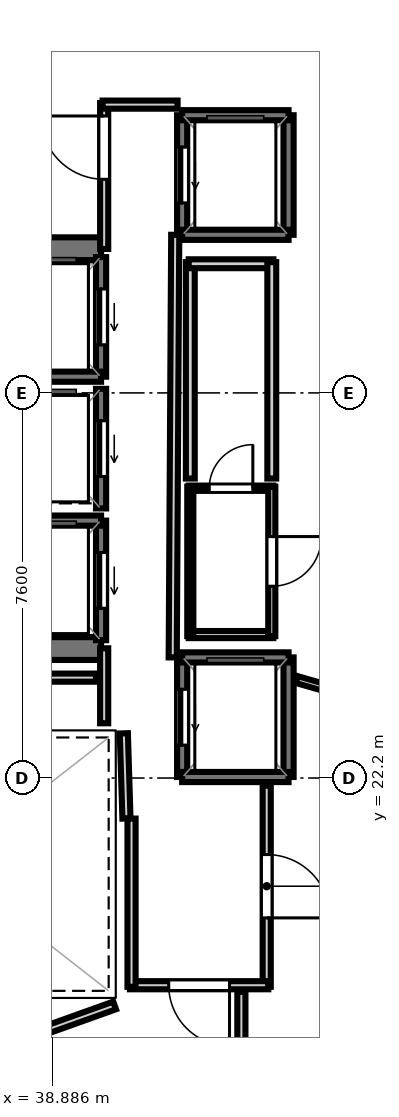
"""IFC4 building model, lengths in metres.
Left out: names, types, materials, properties, quantities, classifications, styles, units other than length and angle.
Written with IfcOpenShell. Run it as: python <this file> out.ifc"""

import sys

from ifc_helpers import new_model, si_unit, direction, frame, frame_2d, origin, place, context, subcontext, project, spatial, rectangle, extrude, element, fill, save


model = new_model("IFC4")
c1 = context("Model", 3, precision=1e-05, world=origin(), true_north=direction((0.0, 1.0)))
c2 = subcontext(c1, "Body", "Model", "MODEL_VIEW")
j1 = project(units=[si_unit("LENGTHUNIT", "METRE"), si_unit("PLANEANGLEUNIT", "RADIAN")], contexts=[c1])
p1 = place(None, origin())
s1 = spatial("IfcSite", under=j1, at=p1, CompositionType="ELEMENT")
p2 = place(p1, origin())
s2 = spatial("IfcBuilding", under=s1, at=p2, CompositionType="ELEMENT")
p3 = place(p2, frame((0.0, 0.0, 340.7)))
s3 = spatial("IfcBuildingStorey", under=s2, at=p3, CompositionType="ELEMENT", Elevation=340.7)
p4 = place(p3, frame((29.33, 32.645, 0.0), z_axis=(0.0, 0.0, 1.0), x_axis=(1.0, 0.0, 0.0)))
e1 = element("IfcWall", 1, at=p4, inside=s3, PredefinedType="SHEAR", context=c2, shape_type="SweptSolid", body=[
    extrude(rectangle(XDim=10.52, YDim=0.45, at=frame_2d((5.26, 0.0))), origin(), (0.0, 0.0, 1.0), 3.52),
])
p5 = place(p4, frame((0.895, 0.0, 0.0)))
e2 = element("IfcOpeningElement", 2, at=p5, cuts=e1, PredefinedType="OPENING", context=c2, shape_type="SweptSolid", body=[
    extrude(rectangle(XDim=1.25, YDim=2.15, at=frame_2d((0.625, 1.075))), frame((0.0, 0.235, 0.0), z_axis=(0.0, -1.0, 0.0), x_axis=(1.0, 0.0, 0.0)), (0.0, 0.0, 1.0), 0.47),
])
p6 = place(p3, frame((29.33, 24.755, 0.0), z_axis=(0.0, 0.0, 1.0), x_axis=(1.0, 0.0, 0.0)))
e3 = element("IfcWall", 3, at=p6, inside=s3, PredefinedType="SHEAR", context=c2, shape_type="SweptSolid", body=[
    extrude(rectangle(XDim=10.52, YDim=0.45, at=frame_2d((5.26, 0.0))), origin(), (0.0, 0.0, 1.0), 3.52),
])
p7 = place(p6, frame((0.695, 0.0, 0.0)))
e4 = element("IfcOpeningElement", 4, at=p7, cuts=e3, PredefinedType="OPENING", context=c2, shape_type="SweptSolid", body=[
    extrude(rectangle(XDim=1.25, YDim=2.15, at=frame_2d((0.625, 1.075))), frame((0.0, 0.235, 0.0), z_axis=(0.0, -1.0, 0.0), x_axis=(1.0, 0.0, 0.0)), (0.0, 0.0, 1.0), 0.47),
])
p8 = place(p3, frame((39.85, 30.12, 0.0), z_axis=(0.0, 0.0, 1.0), x_axis=(0.0, 1.0, 0.0)))
e5 = element("IfcWall", 5, at=p8, inside=s3, PredefinedType="SOLIDWALL", context=c2, shape_type="SweptSolid", body=[
    extrude(rectangle(XDim=2.36, YDim=0.2, at=frame_2d((1.18, 0.0))), origin(), (0.0, 0.0, 1.0), 3.52),
])
p9 = place(p8, frame((0.63, 0.0, 0.0)))
e6 = element("IfcOpeningElement", 6, at=p9, cuts=e5, PredefinedType="OPENING", context=c2, shape_type="SweptSolid", body=[
    extrude(rectangle(XDim=1.1, YDim=2.15, at=frame_2d((0.55, 1.075))), frame((0.0, 0.11, 0.0), z_axis=(0.0, -1.0, 0.0), x_axis=(1.0, 0.0, 0.0)), (0.0, 0.0, 1.0), 0.22),
])
p10 = place(p3, frame((37.75, 30.12, 0.0), z_axis=(0.0, 0.0, 1.0), x_axis=(1.0, 0.0, 0.0)))
e7 = element("IfcWall", 7, at=p10, inside=s3, PredefinedType="SOLIDWALL", context=c2, shape_type="SweptSolid", body=[
    extrude(rectangle(XDim=2.1, YDim=0.2, at=frame_2d((1.05, 0.0))), origin(), (0.0, 0.0, 1.0), 3.52),
])
p11 = place(p3, frame((39.85, 24.92, 0.0), z_axis=(0.0, 0.0, 1.0), x_axis=(0.0, 1.0, 0.0)))
e8 = element("IfcWall", 8, at=p11, inside=s3, PredefinedType="SOLIDWALL", context=c2, shape_type="SweptSolid", body=[
    extrude(rectangle(XDim=2.36, YDim=0.2, at=frame_2d((1.18, 0.0))), origin(), (0.0, 0.0, 1.0), 3.52),
])
p12 = place(p11, frame((0.63, 0.0, 0.0)))
e9 = element("IfcOpeningElement", 9, at=p12, cuts=e8, PredefinedType="OPENING", context=c2, shape_type="SweptSolid", body=[
    extrude(rectangle(XDim=1.1, YDim=2.15, at=frame_2d((0.55, 1.075))), frame((0.0, 0.11, 0.0), z_axis=(0.0, -1.0, 0.0), x_axis=(1.0, 0.0, 0.0)), (0.0, 0.0, 1.0), 0.22),
])
p13 = place(p3, frame((37.75, 27.28, 0.0), z_axis=(0.0, 0.0, 1.0), x_axis=(1.0, 0.0, 0.0)))
e10 = element("IfcWall", 10, at=p13, inside=s3, PredefinedType="SOLIDWALL", context=c2, shape_type="SweptSolid", body=[
    extrude(rectangle(XDim=2.1, YDim=0.2, at=frame_2d((1.05, 0.0))), origin(), (0.0, 0.0, 1.0), 3.52),
])
p14 = place(p3, frame((39.85, 27.52, 0.0), z_axis=(0.0, 0.0, 1.0), x_axis=(0.0, 1.0, 0.0)))
e11 = element("IfcWall", 11, at=p14, inside=s3, PredefinedType="SOLIDWALL", context=c2, shape_type="SweptSolid", body=[
    extrude(rectangle(XDim=2.36, YDim=0.2, at=frame_2d((1.18, 0.0))), origin(), (0.0, 0.0, 1.0), 3.52),
])
p15 = place(p14, frame((0.63, 0.0, 0.0)))
e12 = element("IfcOpeningElement", 12, at=p15, cuts=e11, PredefinedType="OPENING", context=c2, shape_type="SweptSolid", body=[
    extrude(rectangle(XDim=1.1, YDim=2.15, at=frame_2d((0.55, 1.075))), frame((0.0, 0.11, 0.0), z_axis=(0.0, -1.0, 0.0), x_axis=(1.0, 0.0, 0.0)), (0.0, 0.0, 1.0), 0.22),
])
p16 = place(p3, frame((43.55, 22.22, 0.0), z_axis=(0.0, 0.0, 1.0), x_axis=(0.0, 1.0, 0.0)))
e13 = element("IfcWall", 13, at=p16, inside=s3, PredefinedType="SOLIDWALL", context=c2, shape_type="SweptSolid", body=[
    extrude(rectangle(XDim=2.36, YDim=0.2, at=frame_2d((1.18, 0.0))), origin(), (0.0, 0.0, 1.0), 3.52),
])
p17 = place(p3, frame((41.45, 22.22, 0.0), z_axis=(0.0, 0.0, 1.0), x_axis=(0.0, 1.0, 0.0)))
e14 = element("IfcWall", 14, at=p17, inside=s3, PredefinedType="SOLIDWALL", context=c2, shape_type="SweptSolid", body=[
    extrude(rectangle(XDim=2.36, YDim=0.2, at=frame_2d((1.18, 0.0))), origin(), (0.0, 0.0, 1.0), 3.52),
])
p18 = place(p17, frame((0.63, 0.0, 0.0)))
e15 = element("IfcOpeningElement", 15, at=p18, cuts=e14, PredefinedType="OPENING", context=c2, shape_type="SweptSolid", body=[
    extrude(rectangle(XDim=1.1, YDim=2.15, at=frame_2d((0.55, 1.075))), frame((0.0, 0.11, 0.0), z_axis=(0.0, -1.0, 0.0), x_axis=(1.0, 0.0, 0.0)), (0.0, 0.0, 1.0), 0.22),
])
for number, where, z_axis, x_axis in (
    (16, (41.45, 24.58, 0.0), (0.0, 0.0, 1.0), (1.0, 0.0, 0.0)),
    (17, (41.45, 22.22, 0.0), (0.0, 0.0, 1.0), (1.0, 0.0, 0.0)),
):
    element("IfcWall", number, at=place(p3, frame(where, z_axis=z_axis, x_axis=x_axis)), inside=s3, PredefinedType="SOLIDWALL", context=c2, shape_type="SweptSolid", body=[
        extrude(rectangle(XDim=2.1, YDim=0.2, at=frame_2d((1.05, 0.0))), origin(), (0.0, 0.0, 1.0), 3.52),
    ])
p19 = place(p3, frame((43.55, 32.92, 0.0), z_axis=(0.0, 0.0, 1.0), x_axis=(0.0, 1.0, 0.0)))
e18 = element("IfcWall", 18, at=p19, inside=s3, PredefinedType="SOLIDWALL", context=c2, shape_type="SweptSolid", body=[
    extrude(rectangle(XDim=2.36, YDim=0.2, at=frame_2d((1.18, 0.0))), origin(), (0.0, 0.0, 1.0), 3.52),
])
p20 = place(p3, frame((41.45, 32.92, 0.0), z_axis=(0.0, 0.0, 1.0), x_axis=(0.0, 1.0, 0.0)))
e19 = element("IfcWall", 19, at=p20, inside=s3, PredefinedType="SOLIDWALL", context=c2, shape_type="SweptSolid", body=[
    extrude(rectangle(XDim=2.36, YDim=0.2, at=frame_2d((1.18, 0.0))), origin(), (0.0, 0.0, 1.0), 3.52),
])
p21 = place(p20, frame((0.63, 0.0, 0.0)))
e20 = element("IfcOpeningElement", 20, at=p21, cuts=e19, PredefinedType="OPENING", context=c2, shape_type="SweptSolid", body=[
    extrude(rectangle(XDim=1.1, YDim=2.15, at=frame_2d((0.55, 1.075))), frame((0.0, 0.11, 0.0), z_axis=(0.0, -1.0, 0.0), x_axis=(1.0, 0.0, 0.0)), (0.0, 0.0, 1.0), 0.22),
])
for number, where, z_axis, x_axis in (
    (21, (41.45, 35.28, 0.0), (0.0, 0.0, 1.0), (1.0, 0.0, 0.0)),
    (22, (41.45, 32.92, 0.0), (0.0, 0.0, 1.0), (1.0, 0.0, 0.0)),
):
    element("IfcWall", number, at=place(p3, frame(where, z_axis=z_axis, x_axis=x_axis)), inside=s3, PredefinedType="SOLIDWALL", context=c2, shape_type="SweptSolid", body=[
        extrude(rectangle(XDim=2.1, YDim=0.2, at=frame_2d((1.05, 0.0))), origin(), (0.0, 0.0, 1.0), 3.52),
    ])
p22 = place(p3, frame((40.351, 21.401, 0.0), z_axis=(0.0, 0.0, 1.0), x_axis=(-0.031058045979, 0.999517582527, 0.0)))
e23 = element("IfcWall", 23, at=p22, inside=s3, PredefinedType="PARTITIONING", context=c2, shape_type="SweptSolid", body=[
    extrude(rectangle(XDim=1.682, YDim=0.16, at=frame_2d((0.841, 0.0))), origin(), (0.0, 0.0, 1.0), 2.84),
])
p23 = place(p3, frame((39.911, 23.28, 0.0), z_axis=(0.0, 0.0, 1.0), x_axis=(0.0, 1.0, 0.0)))
e24 = element("IfcWall", 24, at=p23, inside=s3, PredefinedType="PARTITIONING", context=c2, shape_type="SweptSolid", body=[
    extrude(rectangle(XDim=1.48, YDim=0.16, at=frame_2d((0.74, 0.0))), origin(), (0.0, 0.0, 1.0), 2.84),
])
p24 = place(p3, frame((39.911, 32.64, 0.0), z_axis=(0.0, 0.0, 1.0), x_axis=(0.0, 1.0, 0.0)))
e25 = element("IfcWall", 25, at=p24, inside=s3, PredefinedType="PARTITIONING", context=c2, shape_type="SweptSolid", body=[
    extrude(rectangle(XDim=2.88, YDim=0.16, at=frame_2d((1.44, 0.0))), origin(), (0.0, 0.0, 1.0), 2.84),
])
p25 = place(p24, frame((1.375, 0.0, 0.0)))
e26 = element("IfcOpeningElement", 26, at=p25, cuts=e25, PredefinedType="OPENING", context=c2, shape_type="SweptSolid", body=[
    extrude(rectangle(XDim=1.25, YDim=2.2, at=frame_2d((0.625, 1.1))), frame((0.0, 0.09, 0.0), z_axis=(0.0, -1.0, 0.0), x_axis=(1.0, 0.0, 0.0)), (0.0, 0.0, 1.0), 0.18),
])
p26 = place(p3, frame((39.88, 35.489, 0.0), z_axis=(0.0, 0.0, 1.0), x_axis=(1.0, 0.0, 0.0)))
e27 = element("IfcWall", 27, at=p26, inside=s3, PredefinedType="PARTITIONING", context=c2, shape_type="SweptSolid", body=[
    extrude(rectangle(XDim=1.48, YDim=0.16, at=frame_2d((0.74, 0.0))), origin(), (0.0, 0.0, 1.0), 2.84),
])
p27 = place(p3, frame((41.313, 32.92, 0.0), z_axis=(0.0, 0.0, 1.0), x_axis=(-0.005942518022, -0.999982343084, 0.0)))
e28 = element("IfcWall", 28, at=p27, inside=s3, PredefinedType="PARTITIONING", context=c2, shape_type="SweptSolid", body=[
    extrude(rectangle(XDim=8.34, YDim=0.16, at=frame_2d((4.17, 0.0))), origin(), (0.0, 0.0, 1.0), 2.84),
])
p28 = place(p3, frame((43.119, 22.05, 0.0), z_axis=(0.0, 0.0, 1.0), x_axis=(0.0, -1.0, 0.0)))
e29 = element("IfcWall", 29, at=p28, inside=s3, PredefinedType="PARTITIONING", context=c2, shape_type="SweptSolid", body=[
    extrude(rectangle(XDim=3.97, YDim=0.16, at=frame_2d((1.985, 0.0))), origin(), (0.0, 0.0, 1.0), 2.84),
])
p29 = place(p28, frame((1.36, 0.0, 0.0)))
e30 = element("IfcOpeningElement", 30, at=p29, cuts=e29, PredefinedType="OPENING", context=c2, shape_type="SweptSolid", body=[
    extrude(rectangle(XDim=1.25, YDim=2.2, at=frame_2d((0.625, 1.1))), frame((0.0, 0.09, 0.0), z_axis=(0.0, -1.0, 0.0), x_axis=(1.0, 0.0, 0.0)), (0.0, 0.0, 1.0), 0.18),
])
p30 = place(p3, frame((43.15, 18.111, 0.0), z_axis=(0.0, 0.0, 1.0), x_axis=(-1.0, 0.0, 0.0)))
e31 = element("IfcWall", 31, at=p30, inside=s3, PredefinedType="PARTITIONING", context=c2, shape_type="SweptSolid", body=[
    extrude(rectangle(XDim=2.73, YDim=0.16, at=frame_2d((1.365, 0.0))), origin(), (0.0, 0.0, 1.0), 2.84),
])
p31 = place(p30, frame((0.765, 0.0, 0.0)))
e32 = element("IfcOpeningElement", 32, at=p31, cuts=e31, PredefinedType="OPENING", context=c2, shape_type="SweptSolid", body=[
    extrude(rectangle(XDim=1.2, YDim=2.15, at=frame_2d((0.6, 1.075))), frame((0.0, 0.09, 0.0), z_axis=(0.0, -1.0, 0.0), x_axis=(1.0, 0.0, 0.0)), (0.0, 0.0, 1.0), 0.18),
])
p32 = place(p3, frame((40.451, 18.08, 0.0), z_axis=(0.0, 0.0, 1.0), x_axis=(0.0, 1.0, 0.0)))
e33 = element("IfcWall", 33, at=p32, inside=s3, PredefinedType="PARTITIONING", context=c2, shape_type="SweptSolid", body=[
    extrude(rectangle(XDim=3.32, YDim=0.16, at=frame_2d((1.66, 0.0))), origin(), (0.0, 0.0, 1.0), 2.84),
])
p33 = place(p3, frame((43.25, 25.031, 0.0), z_axis=(0.0, 0.0, 1.0), x_axis=(-1.0, 0.0, 0.0)))
e34 = element("IfcWall", 34, at=p33, inside=s3, PredefinedType="PARTITIONING", context=c2, shape_type="SweptSolid", body=[
    extrude(rectangle(XDim=1.67, YDim=0.14, at=frame_2d((0.835, 0.0))), origin(), (0.0, 0.0, 1.0), 2.84),
])
p34 = place(p3, frame((41.611, 25.0, 0.0), z_axis=(0.0, 0.0, 1.0), x_axis=(0.0, 1.0, 0.0)))
e35 = element("IfcWall", 35, at=p34, inside=s3, PredefinedType="PARTITIONING", context=c2, shape_type="SweptSolid", body=[
    extrude(rectangle(XDim=2.95, YDim=0.12, at=frame_2d((1.475, 0.0))), origin(), (0.0, 0.0, 1.0), 2.84),
])
p35 = place(p3, frame((41.58, 27.919, 0.0), z_axis=(0.0, 0.0, 1.0), x_axis=(1.0, 0.0, 0.0)))
e36 = element("IfcWall", 36, at=p35, inside=s3, PredefinedType="PARTITIONING", context=c2, shape_type="SweptSolid", body=[
    extrude(rectangle(XDim=1.67, YDim=0.105, at=frame_2d((0.835, 0.0))), origin(), (0.0, 0.0, 1.0), 2.84),
])
p36 = place(p35, frame((0.405, 0.0, 0.0)))
e37 = element("IfcOpeningElement", 37, at=p36, cuts=e36, PredefinedType="OPENING", context=c2, shape_type="SweptSolid", body=[
    extrude(rectangle(XDim=0.86, YDim=2.05, at=frame_2d((0.43, 1.025))), frame((0.0, 0.062, 0.0), z_axis=(0.0, -1.0, 0.0), x_axis=(1.0, 0.0, 0.0)), (0.0, 0.0, 1.0), 0.125),
])
p37 = place(p3, frame((43.219, 27.95, 0.0), z_axis=(0.0, 0.0, 1.0), x_axis=(0.0, -1.0, 0.0)))
e38 = element("IfcWall", 38, at=p37, inside=s3, PredefinedType="PARTITIONING", context=c2, shape_type="SweptSolid", body=[
    extrude(rectangle(XDim=2.95, YDim=0.14, at=frame_2d((1.475, 0.0))), origin(), (0.0, 0.0, 1.0), 2.84),
])
p38 = place(p37, frame((0.985, 0.0, 0.0)))
e39 = element("IfcOpeningElement", 39, at=p38, cuts=e38, PredefinedType="OPENING", context=c2, shape_type="SweptSolid", body=[
    extrude(rectangle(XDim=0.98, YDim=2.1, at=frame_2d((0.49, 1.05))), frame((0.0, 0.08, 0.0), z_axis=(0.0, -1.0, 0.0), x_axis=(1.0, 0.0, 0.0)), (0.0, 0.0, 1.0), 0.16),
])
p39 = place(p3, frame((41.611, 28.11, 0.0), z_axis=(0.0, 0.0, 1.0), x_axis=(0.0, 1.0, 0.0)))
e40 = element("IfcWall", 40, at=p39, inside=s3, PredefinedType="PLUMBINGWALL", context=c2, shape_type="SweptSolid", body=[
    extrude(rectangle(XDim=4.27, YDim=0.175, at=frame_2d((2.135, 0.0))), origin(), (0.0, 0.0, 1.0), 2.84),
])
p40 = place(p3, frame((41.58, 32.349, 0.0), z_axis=(0.0, 0.0, 1.0), x_axis=(1.0, 0.0, 0.0)))
e41 = element("IfcWall", 41, at=p40, inside=s3, PredefinedType="PLUMBINGWALL", context=c2, shape_type="SweptSolid", body=[
    extrude(rectangle(XDim=1.67, YDim=0.175, at=frame_2d((0.835, 0.0))), origin(), (0.0, 0.0, 1.0), 2.84),
])
p41 = place(p3, frame((43.219, 32.38, 0.0), z_axis=(0.0, 0.0, 1.0), x_axis=(0.0, -1.0, 0.0)))
e42 = element("IfcWall", 42, at=p41, inside=s3, PredefinedType="PLUMBINGWALL", context=c2, shape_type="SweptSolid", body=[
    extrude(rectangle(XDim=4.27, YDim=0.175, at=frame_2d((2.135, 0.0))), origin(), (0.0, 0.0, 1.0), 2.84),
])
p42 = place(p3, frame((39.75, 24.181, 0.0), z_axis=(0.0, 0.0, 1.0), x_axis=(-1.0, 0.0, 0.0)))
e43 = element("IfcWall", 43, at=p42, inside=s3, PredefinedType="PARTITIONING", context=c2, shape_type="SweptSolid", body=[
    extrude(rectangle(XDim=6.22, YDim=0.16, at=frame_2d((3.11, 0.0))), origin(), (0.0, 0.0, 1.0), 2.84),
])
p43 = place(p3, frame((36.81, 16.529, 0.0), z_axis=(0.0, 0.0, 1.0), x_axis=(0.941548344365, 0.33687789364, 0.0)))
e44 = element("IfcWall", 44, at=p43, inside=s3, PredefinedType="PARTITIONING", context=c2, shape_type="SweptSolid", body=[
    extrude(rectangle(XDim=3.513, YDim=0.16, at=frame_2d((1.756, 0.0))), origin(), (0.0, 0.0, 1.0), 2.84),
])
p44 = place(p3, frame((42.619, 17.98, 0.0), z_axis=(0.0, 0.0, 1.0), x_axis=(0.0, -1.0, 0.0)))
e45 = element("IfcWall", 45, at=p44, inside=s3, PredefinedType="PARTITIONING", context=c2, shape_type="SweptSolid", body=[
    extrude(rectangle(XDim=1.93, YDim=0.16, at=frame_2d((0.965, 0.0))), origin(), (0.0, 0.0, 1.0), 2.84),
])
p45 = place(p3, frame((43.711, 24.143, 0.0), z_axis=(0.0, 0.0, 1.0), x_axis=(0.9612562867, -0.275656219374, 0.0)))
e46 = element("IfcWall", 46, at=p45, inside=s3, PredefinedType="PARTITIONING", context=c2, shape_type="SweptSolid", body=[
    extrude(rectangle(XDim=3.896, YDim=0.14, at=frame_2d((1.948, 0.0))), origin(), (0.0, 0.0, 1.0), 2.84),
])
p46 = place(p9, origin())
e47 = element("IfcDoor", 47, at=p46, inside=s3, OperationType="SLIDING_TO_LEFT", PredefinedType="DOOR", context=c2, shape_type="SweptSolid", body=[
    extrude(rectangle(XDim=1.1, YDim=2.15, at=frame_2d((0.55, 1.075))), frame((0.0, 0.025, 0.0), z_axis=(0.0, -1.0, 0.0), x_axis=(1.0, 0.0, 0.0)), (0.0, 0.0, 1.0), 0.05),
])
fill(e6, e47)
p47 = place(p12, origin())
e48 = element("IfcDoor", 48, at=p47, inside=s3, OperationType="SLIDING_TO_LEFT", PredefinedType="DOOR", context=c2, shape_type="SweptSolid", body=[
    extrude(rectangle(XDim=1.1, YDim=2.15, at=frame_2d((0.55, 1.075))), frame((0.0, 0.025, 0.0), z_axis=(0.0, -1.0, 0.0), x_axis=(1.0, 0.0, 0.0)), (0.0, 0.0, 1.0), 0.05),
])
fill(e9, e48)
p48 = place(p15, origin())
e49 = element("IfcDoor", 49, at=p48, inside=s3, OperationType="SLIDING_TO_LEFT", PredefinedType="DOOR", context=c2, shape_type="SweptSolid", body=[
    extrude(rectangle(XDim=1.1, YDim=2.15, at=frame_2d((0.55, 1.075))), frame((0.0, 0.025, 0.0), z_axis=(0.0, -1.0, 0.0), x_axis=(1.0, 0.0, 0.0)), (0.0, 0.0, 1.0), 0.05),
])
fill(e12, e49)
p49 = place(p18, origin())
e50 = element("IfcDoor", 50, at=p49, inside=s3, OperationType="SLIDING_TO_LEFT", PredefinedType="DOOR", context=c2, shape_type="SweptSolid", body=[
    extrude(rectangle(XDim=1.1, YDim=2.15, at=frame_2d((0.55, 1.075))), frame((0.0, 0.025, 0.0), z_axis=(0.0, -1.0, 0.0), x_axis=(1.0, 0.0, 0.0)), (0.0, 0.0, 1.0), 0.05),
])
fill(e15, e50)
p50 = place(p21, origin())
e51 = element("IfcDoor", 51, at=p50, inside=s3, OperationType="SLIDING_TO_LEFT", PredefinedType="DOOR", context=c2, shape_type="SweptSolid", body=[
    extrude(rectangle(XDim=1.1, YDim=2.15, at=frame_2d((0.55, 1.075))), frame((0.0, 0.025, 0.0), z_axis=(0.0, -1.0, 0.0), x_axis=(1.0, 0.0, 0.0)), (0.0, 0.0, 1.0), 0.05),
])
fill(e20, e51)
p51 = place(p31, origin())
e52 = element("IfcDoor", 52, at=p51, inside=s3, OperationType="SINGLE_SWING_LEFT", PredefinedType="DOOR", context=c2, shape_type="SweptSolid", body=[
    extrude(rectangle(XDim=1.2, YDim=2.15, at=frame_2d((0.6, 1.075))), frame((0.0, 0.025, 0.0), z_axis=(0.0, -1.0, 0.0), x_axis=(1.0, 0.0, 0.0)), (0.0, 0.0, 1.0), 0.05),
])
fill(e32, e52)
p52 = place(p29, origin())
e53 = element("IfcDoor", 53, at=p52, inside=s3, OperationType="SINGLE_SWING_RIGHT", PredefinedType="DOOR", context=c2, shape_type="SweptSolid", body=[
    extrude(rectangle(XDim=1.25, YDim=2.2, at=frame_2d((0.625, 1.1))), frame((0.0, 0.025, 0.0), z_axis=(0.0, -1.0, 0.0), x_axis=(1.0, 0.0, 0.0)), (0.0, 0.0, 1.0), 0.05),
])
fill(e30, e53)
p53 = place(p25, origin())
e54 = element("IfcDoor", 54, at=p53, inside=s3, OperationType="SINGLE_SWING_RIGHT", PredefinedType="DOOR", context=c2, shape_type="SweptSolid", body=[
    extrude(rectangle(XDim=1.25, YDim=2.2, at=frame_2d((0.625, 1.1))), frame((0.0, 0.025, 0.0), z_axis=(0.0, -1.0, 0.0), x_axis=(1.0, 0.0, 0.0)), (0.0, 0.0, 1.0), 0.05),
])
fill(e26, e54)
p54 = place(p38, origin())
e55 = element("IfcDoor", 55, at=p54, inside=s3, OperationType="SINGLE_SWING_LEFT", PredefinedType="DOOR", context=c2, shape_type="SweptSolid", body=[
    extrude(rectangle(XDim=0.98, YDim=2.1, at=frame_2d((0.49, 1.05))), frame((0.0, 0.025, 0.0), z_axis=(0.0, -1.0, 0.0), x_axis=(1.0, 0.0, 0.0)), (0.0, 0.0, 1.0), 0.05),
])
fill(e39, e55)
p55 = place(p36, origin())
e56 = element("IfcDoor", 56, at=p55, inside=s3, OperationType="SINGLE_SWING_RIGHT", PredefinedType="DOOR", context=c2, shape_type="SweptSolid", body=[
    extrude(rectangle(XDim=0.86, YDim=2.05, at=frame_2d((0.43, 1.025))), frame((0.0, 0.025, 0.0), z_axis=(0.0, -1.0, 0.0), x_axis=(1.0, 0.0, 0.0)), (0.0, 0.0, 1.0), 0.05),
])
fill(e37, e56)
save(model, sys.argv[1])
